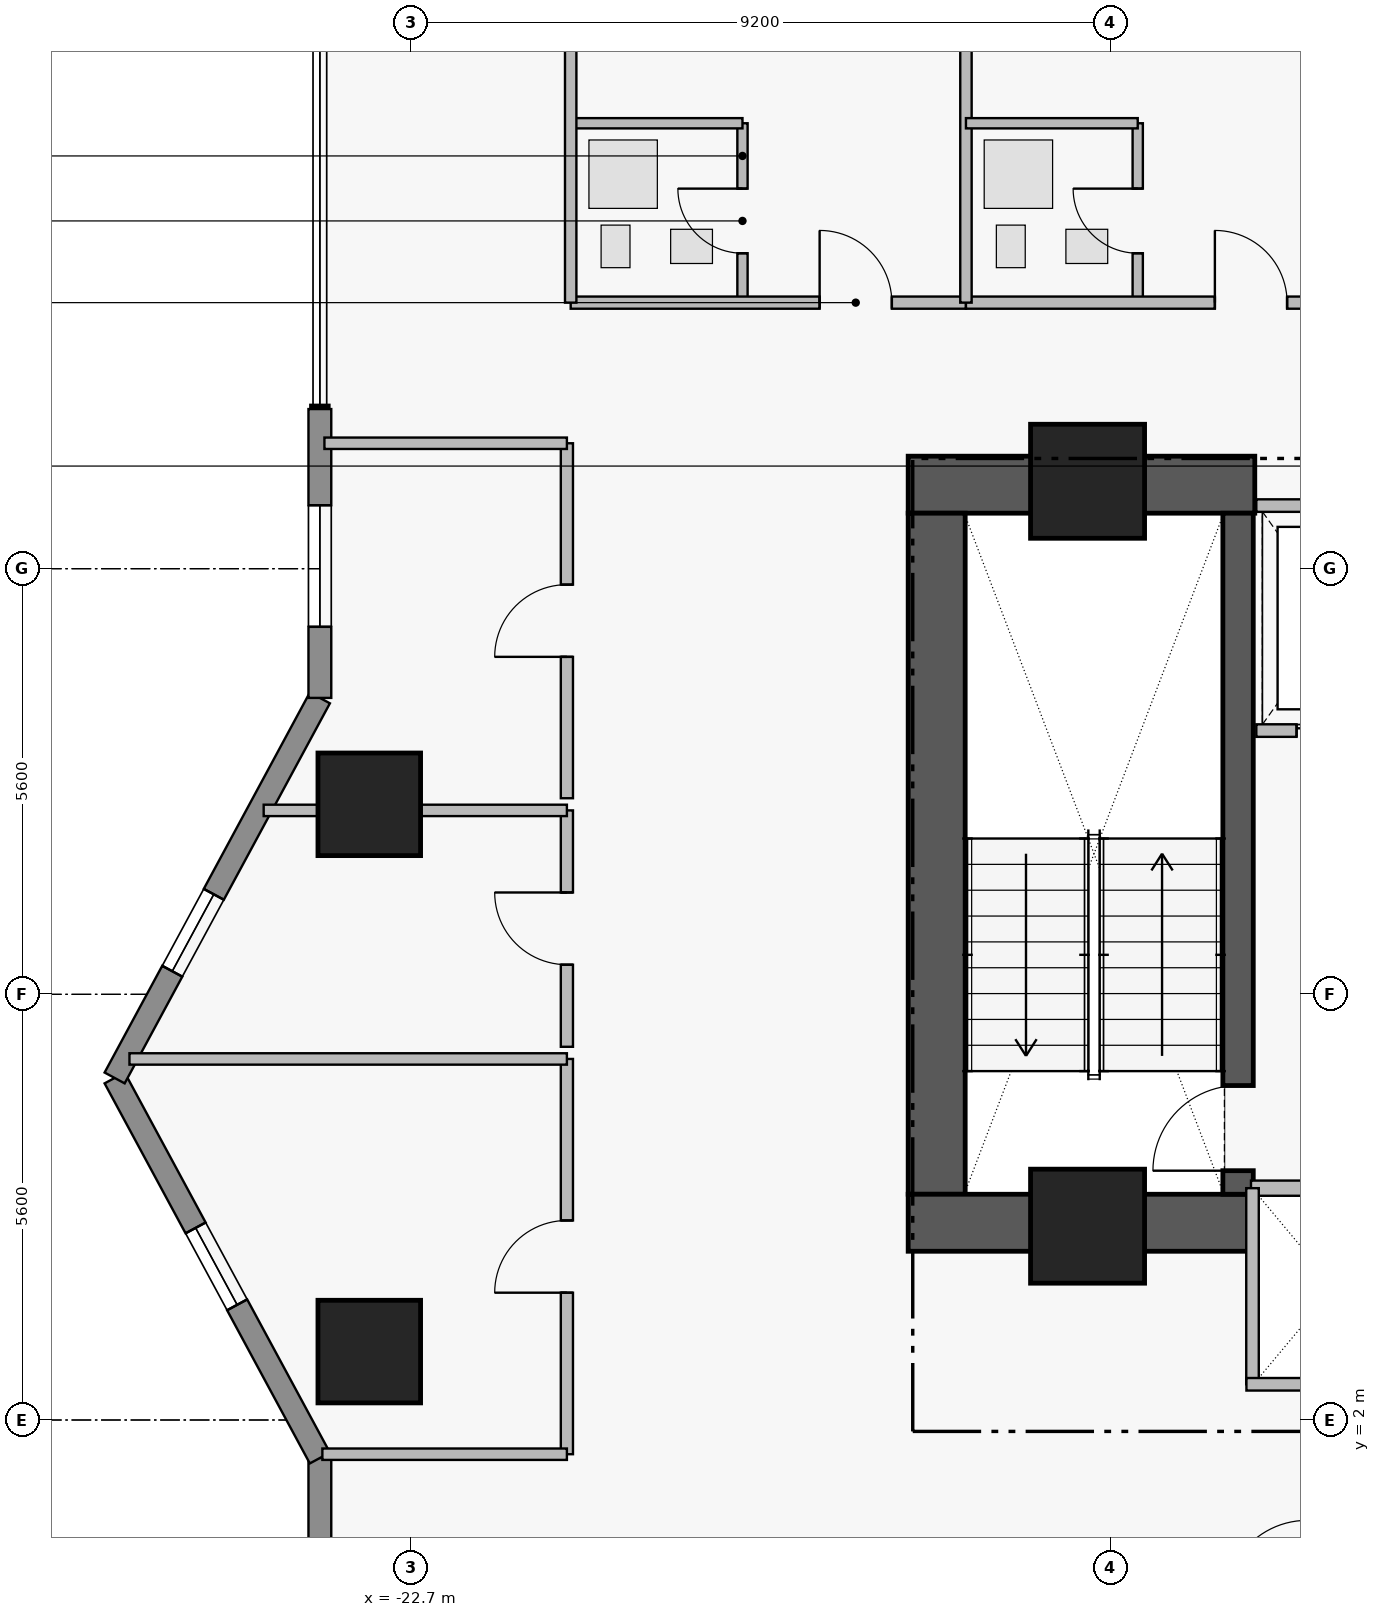
"""IFC4 building model, lengths in metres.
Left out: names, types, materials, properties, quantities, classifications, styles, units other than length and angle.
Written with IfcOpenShell. Run it as: python <this file> out.ifc"""

import sys

from ifc_helpers import new_model, si_unit, direction, frame, frame_2d, origin, origin_2d, place, context, subcontext, project, spatial, rectangle, extrude, element, fill, save


model = new_model("IFC4")
c1 = context("Model", 3, precision=1e-05, world=origin(), true_north=direction((0.0, 1.0)))
c2 = subcontext(c1, "Body", "Model", "MODEL_VIEW")
j1 = project(units=[si_unit("LENGTHUNIT", "METRE"), si_unit("PLANEANGLEUNIT", "RADIAN")], contexts=[c1])
p1 = place(None, origin())
s1 = spatial("IfcSite", under=j1, at=p1, CompositionType="ELEMENT")
p2 = place(p1, origin())
s2 = spatial("IfcBuilding", under=s1, at=p2, CompositionType="ELEMENT")
p3 = place(p2, frame((0.0, 0.0, 106.6)))
s3 = spatial("IfcBuildingStorey", under=s2, at=p3, CompositionType="ELEMENT", Elevation=106.6)
p4 = place(p3, frame((-16.16, 14.305, 0.0), z_axis=(0.0, 0.0, 1.0), x_axis=(1.0, 0.0, 0.0)))
e1 = element("IfcWall", 1, at=p4, inside=s3, PredefinedType="SHEAR", context=c2, shape_type="SweptSolid", body=[
    extrude(rectangle(XDim=4.56, YDim=0.75, at=frame_2d((2.28, 0.0))), origin(), (0.0, 0.0, 1.0), 3.46),
])
p5 = place(p3, frame((-15.785, 4.97, 0.0), z_axis=(0.0, 0.0, 1.0), x_axis=(0.0, 1.0, 0.0)))
e2 = element("IfcWall", 2, at=p5, inside=s3, PredefinedType="SHEAR", context=c2, shape_type="SweptSolid", body=[
    extrude(rectangle(XDim=8.96, YDim=0.75, at=frame_2d((4.48, 0.0))), origin(), (0.0, 0.0, 1.0), 3.46),
])
p6 = place(p3, frame((-16.16, 4.595, 0.0), z_axis=(0.0, 0.0, 1.0), x_axis=(1.0, 0.0, 0.0)))
e3 = element("IfcWall", 3, at=p6, inside=s3, PredefinedType="SHEAR", context=c2, shape_type="SweptSolid", body=[
    extrude(rectangle(XDim=4.56, YDim=0.75, at=frame_2d((2.28, 0.0))), origin(), (0.0, 0.0, 1.0), 3.46),
])
p7 = place(p3, frame((-11.82, 4.97, 0.0), z_axis=(0.0, 0.0, 1.0), x_axis=(0.0, 1.0, 0.0)))
e4 = element("IfcWall", 4, at=p7, inside=s3, PredefinedType="SHEAR", context=c2, shape_type="SweptSolid", body=[
    extrude(rectangle(XDim=8.96, YDim=0.4, at=frame_2d((4.48, 0.0))), origin(), (0.0, 0.0, 1.0), 3.46),
])
p8 = place(p7, frame((0.31, 0.0, 0.0)))
e5 = element("IfcOpeningElement", 5, at=p8, cuts=e4, PredefinedType="OPENING", context=c2, shape_type="SweptSolid", body=[
    extrude(rectangle(XDim=1.12, YDim=2.22, at=frame_2d((0.56, 1.11))), frame((0.0, 0.21, 0.0), z_axis=(0.0, -1.0, 0.0), x_axis=(1.0, 0.0, 0.0)), (0.0, 0.0, 1.0), 0.42),
])
for number, where, z_axis, x_axis in (
    (6, (-13.8, 14.35, 0.0), (0.0, 0.0, 1.0), (1.0, 0.0, 0.0)),
    (7, (-13.8, 4.55, 0.0), (0.0, 0.0, 1.0), (1.0, 0.0, 0.0)),
):
    element("IfcColumn", number, at=place(p3, frame(where, z_axis=z_axis, x_axis=x_axis)), inside=s3, PredefinedType="COLUMN", context=c2, shape_type="SweptSolid", body=[
        extrude(rectangle(XDim=1.5, YDim=1.5, at=origin_2d()), origin(), (0.0, 0.0, 1.0), 3.65),
    ])
for number, where, z_axis, x_axis in (
    (8, (-23.25, 2.9, 0.0), (0.0, 0.0, 1.0), (1.0, 0.0, 0.0)),
    (9, (-23.25, 10.1, 0.0), (0.0, 0.0, 1.0), (1.0, 0.0, 0.0)),
):
    element("IfcColumn", number, at=place(p3, frame(where, z_axis=z_axis, x_axis=x_axis)), inside=s3, PredefinedType="COLUMN", context=c2, shape_type="SweptSolid", body=[
        extrude(rectangle(XDim=1.35, YDim=1.35, at=origin_2d()), origin(), (0.0, 0.0, 1.0), 3.65),
    ])
p9 = place(p3, frame((-23.9, 0.35, 0.0), z_axis=(0.0, 0.0, 1.0), x_axis=(0.0, 1.0, 0.0)))
e10 = element("IfcWall", 10, at=p9, inside=s3, PredefinedType="STANDARD", context=c2, shape_type="SweptSolid", body=[
    extrude(rectangle(XDim=1.15, YDim=0.3, at=frame_2d((0.575, 0.0))), origin(), (0.0, 0.0, 1.0), 3.43),
])
p10 = place(p3, frame((-23.9, 1.5, 0.0), z_axis=(0.0, 0.0, 1.0), x_axis=(-0.475175525499, 0.879891027325, 0.0)))
e11 = element("IfcWall", 11, at=p10, inside=s3, PredefinedType="STANDARD", context=c2, shape_type="SweptSolid", body=[
    extrude(rectangle(XDim=5.683, YDim=0.3, at=frame_2d((2.841, 0.0))), origin(), (0.0, 0.0, 1.0), 3.43),
])
p11 = place(p10, frame((2.29, 0.0, 1.25)))
e12 = element("IfcOpeningElement", 12, at=p11, cuts=e11, PredefinedType="OPENING", context=c2, shape_type="SweptSolid", body=[
    extrude(rectangle(XDim=1.15, YDim=1.55, at=frame_2d((0.575, 0.775))), frame((0.0, 0.16, 0.0), z_axis=(0.0, -1.0, 0.0), x_axis=(1.0, 0.0, 0.0)), (0.0, 0.0, 1.0), 0.32),
])
p12 = place(p3, frame((-26.6, 6.5, 0.0), z_axis=(0.0, 0.0, 1.0), x_axis=(0.475175525499, 0.879891027325, 0.0)))
e13 = element("IfcWall", 13, at=p12, inside=s3, PredefinedType="STANDARD", context=c2, shape_type="SweptSolid", body=[
    extrude(rectangle(XDim=5.683, YDim=0.3, at=frame_2d((2.841, 0.0))), origin(), (0.0, 0.0, 1.0), 3.43),
])
p13 = place(p12, frame((1.596, 0.0, 1.25)))
e14 = element("IfcOpeningElement", 14, at=p13, cuts=e13, PredefinedType="OPENING", context=c2, shape_type="SweptSolid", body=[
    extrude(rectangle(XDim=1.15, YDim=1.55, at=frame_2d((0.575, 0.775))), frame((0.0, 0.16, 0.0), z_axis=(0.0, -1.0, 0.0), x_axis=(1.0, 0.0, 0.0)), (0.0, 0.0, 1.0), 0.32),
])
p14 = place(p3, frame((-23.9, 11.5, 0.0), z_axis=(0.0, 0.0, 1.0), x_axis=(0.0, 1.0, 0.0)))
e15 = element("IfcWall", 15, at=p14, inside=s3, PredefinedType="STANDARD", context=c2, shape_type="SweptSolid", body=[
    extrude(rectangle(XDim=3.8, YDim=0.3, at=frame_2d((1.9, 0.0))), origin(), (0.0, 0.0, 1.0), 3.43),
])
p15 = place(p14, frame((0.935, 0.0, 0.85)))
e16 = element("IfcOpeningElement", 16, at=p15, cuts=e15, PredefinedType="OPENING", context=c2, shape_type="SweptSolid", body=[
    extrude(rectangle(XDim=1.6, YDim=1.8, at=frame_2d((0.8, 0.9))), frame((0.0, 0.16, 0.0), z_axis=(0.0, -1.0, 0.0), x_axis=(1.0, 0.0, 0.0)), (0.0, 0.0, 1.0), 0.32),
])
p16 = place(p3, frame((-11.58, 11.07, 0.0), z_axis=(0.0, 0.0, 1.0), x_axis=(1.0, 0.0, 0.0)))
e17 = element("IfcWall", 17, at=p16, inside=s3, PredefinedType="PARTITIONING", context=c2, shape_type="SweptSolid", body=[
    extrude(rectangle(XDim=2.16, YDim=0.165, at=frame_2d((1.08, 0.0))), origin(), (0.0, 0.0, 1.0), 3.43),
])
p17 = place(p16, frame((0.53, 0.0, 0.0)))
e18 = element("IfcOpeningElement", 18, at=p17, cuts=e17, PredefinedType="OPENING", context=c2, shape_type="SweptSolid", body=[
    extrude(rectangle(XDim=1.15, YDim=2.25, at=frame_2d((0.575, 1.125))), frame((0.0, 0.093, 0.0), z_axis=(0.0, -1.0, 0.0), x_axis=(1.0, 0.0, 0.0)), (0.0, 0.0, 1.0), 0.185),
])
p18 = place(p3, frame((-18.34, 16.7, 0.0), z_axis=(0.0, 0.0, 1.0), x_axis=(0.0, 1.0, 0.0)))
e19 = element("IfcWall", 19, at=p18, inside=s3, PredefinedType="PLUMBINGWALL", context=c2, shape_type="SweptSolid", body=[
    extrude(rectangle(XDim=2.36, YDim=0.135, at=frame_2d((1.18, 0.0))), origin(), (0.0, 0.0, 1.0), 3.43),
])
p19 = place(p18, frame((0.65, 0.0, 0.0)))
e20 = element("IfcOpeningElement", 20, at=p19, cuts=e19, PredefinedType="OPENING", context=c2, shape_type="SweptSolid", body=[
    extrude(rectangle(XDim=0.85, YDim=2.1, at=frame_2d((0.425, 1.05))), frame((0.0, 0.077, 0.0), z_axis=(0.0, -1.0, 0.0), x_axis=(1.0, 0.0, 0.0)), (0.0, 0.0, 1.0), 0.155),
])
p20 = place(p3, frame((-20.6, 16.7, 0.0), z_axis=(0.0, 0.0, 1.0), x_axis=(1.0, 0.0, 0.0)))
e21 = element("IfcWall", 21, at=p20, inside=s3, PredefinedType="PARTITIONING", context=c2, shape_type="SweptSolid", body=[
    extrude(rectangle(XDim=5.2, YDim=0.16, at=frame_2d((2.6, 0.0))), origin(), (0.0, 0.0, 1.0), 3.43),
])
p21 = place(p20, frame((3.275, 0.0, 0.0)))
e22 = element("IfcOpeningElement", 22, at=p21, cuts=e21, PredefinedType="OPENING", context=c2, shape_type="SweptSolid", body=[
    extrude(rectangle(XDim=0.95, YDim=2.15, at=frame_2d((0.475, 1.075))), frame((0.0, 0.09, 0.0), z_axis=(0.0, -1.0, 0.0), x_axis=(1.0, 0.0, 0.0)), (0.0, 0.0, 1.0), 0.18),
])
p22 = place(p3, frame((-13.14, 16.7, 0.0), z_axis=(0.0, 0.0, 1.0), x_axis=(0.0, 1.0, 0.0)))
e23 = element("IfcWall", 23, at=p22, inside=s3, PredefinedType="PLUMBINGWALL", context=c2, shape_type="SweptSolid", body=[
    extrude(rectangle(XDim=2.36, YDim=0.135, at=frame_2d((1.18, 0.0))), origin(), (0.0, 0.0, 1.0), 3.43),
])
p23 = place(p22, frame((0.65, 0.0, 0.0)))
e24 = element("IfcOpeningElement", 24, at=p23, cuts=e23, PredefinedType="OPENING", context=c2, shape_type="SweptSolid", body=[
    extrude(rectangle(XDim=0.85, YDim=2.1, at=frame_2d((0.425, 1.05))), frame((0.0, 0.077, 0.0), z_axis=(0.0, -1.0, 0.0), x_axis=(1.0, 0.0, 0.0)), (0.0, 0.0, 1.0), 0.155),
])
p24 = place(p3, frame((-15.4, 16.7, 0.0), z_axis=(0.0, 0.0, 1.0), x_axis=(1.0, 0.0, 0.0)))
e25 = element("IfcWall", 25, at=p24, inside=s3, PredefinedType="PARTITIONING", context=c2, shape_type="SweptSolid", body=[
    extrude(rectangle(XDim=5.2, YDim=0.16, at=frame_2d((2.6, 0.0))), origin(), (0.0, 0.0, 1.0), 2.973),
])
p25 = place(p24, frame((3.275, 0.0, 0.0)))
e26 = element("IfcOpeningElement", 26, at=p25, cuts=e25, PredefinedType="OPENING", context=c2, shape_type="SweptSolid", body=[
    extrude(rectangle(XDim=0.95, YDim=2.15, at=frame_2d((0.475, 1.075))), frame((0.0, 0.09, 0.0), z_axis=(0.0, -1.0, 0.0), x_axis=(1.0, 0.0, 0.0)), (0.0, 0.0, 1.0), 0.18),
])
p26 = place(p3, frame((-20.65, 1.55, 0.0), z_axis=(0.0, 0.0, 1.0), x_axis=(0.0, 1.0, 0.0)))
e27 = element("IfcWall", 27, at=p26, inside=s3, PredefinedType="PARTITIONING", context=c2, shape_type="SweptSolid", body=[
    extrude(rectangle(XDim=5.2, YDim=0.16, at=frame_2d((2.6, 0.0))), origin(), (0.0, 0.0, 1.0), 3.43),
])
p27 = place(p26, frame((2.125, 0.0, 0.0)))
e28 = element("IfcOpeningElement", 28, at=p27, cuts=e27, PredefinedType="OPENING", context=c2, shape_type="SweptSolid", body=[
    extrude(rectangle(XDim=0.95, YDim=2.15, at=frame_2d((0.475, 1.075))), frame((0.0, 0.09, 0.0), z_axis=(0.0, -1.0, 0.0), x_axis=(1.0, 0.0, 0.0)), (0.0, 0.0, 1.0), 0.18),
])
p28 = place(p3, frame((-20.65, 6.91, 0.0), z_axis=(0.0, 0.0, 1.0), x_axis=(0.0, 1.0, 0.0)))
e29 = element("IfcWall", 29, at=p28, inside=s3, PredefinedType="PARTITIONING", context=c2, shape_type="SweptSolid", body=[
    extrude(rectangle(XDim=3.11, YDim=0.16, at=frame_2d((1.555, 0.0))), origin(), (0.0, 0.0, 1.0), 3.43),
])
p29 = place(p28, frame((1.08, 0.0, 0.0)))
e30 = element("IfcOpeningElement", 30, at=p29, cuts=e29, PredefinedType="OPENING", context=c2, shape_type="SweptSolid", body=[
    extrude(rectangle(XDim=0.95, YDim=2.15, at=frame_2d((0.475, 1.075))), frame((0.0, 0.09, 0.0), z_axis=(0.0, -1.0, 0.0), x_axis=(1.0, 0.0, 0.0)), (0.0, 0.0, 1.0), 0.18),
])
p30 = place(p3, frame((-20.65, 10.18, 0.0), z_axis=(0.0, 0.0, 1.0), x_axis=(0.0, 1.0, 0.0)))
e31 = element("IfcWall", 31, at=p30, inside=s3, PredefinedType="PARTITIONING", context=c2, shape_type="SweptSolid", body=[
    extrude(rectangle(XDim=4.67, YDim=0.16, at=frame_2d((2.335, 0.0))), origin(), (0.0, 0.0, 1.0), 3.43),
])
p31 = place(p30, frame((1.86, 0.0, 0.0)))
e32 = element("IfcOpeningElement", 32, at=p31, cuts=e31, PredefinedType="OPENING", context=c2, shape_type="SweptSolid", body=[
    extrude(rectangle(XDim=0.95, YDim=2.15, at=frame_2d((0.475, 1.075))), frame((0.0, 0.09, 0.0), z_axis=(0.0, -1.0, 0.0), x_axis=(1.0, 0.0, 0.0)), (0.0, 0.0, 1.0), 0.18),
])
p32 = place(p3, frame((-11.65, 5.05, 0.0), z_axis=(0.0, 0.0, 1.0), x_axis=(1.0, 0.0, 0.0)))
e33 = element("IfcWall", 33, at=p32, inside=s3, PredefinedType="PARTITIONING", context=c2, shape_type="SweptSolid", body=[
    extrude(rectangle(XDim=2.85, YDim=0.2, at=frame_2d((1.425, 0.0))), origin(), (0.0, 0.0, 1.0), 3.43),
])
p33 = place(p3, frame((-11.58, 14.03, 0.0), z_axis=(0.0, 0.0, 1.0), x_axis=(1.0, 0.0, 0.0)))
e34 = element("IfcWall", 34, at=p33, inside=s3, PredefinedType="PARTITIONING", context=c2, shape_type="SweptSolid", body=[
    extrude(rectangle(XDim=2.16, YDim=0.165, at=frame_2d((1.08, 0.0))), origin(), (0.0, 0.0, 1.0), 3.43),
])
p34 = place(p3, frame((-11.63, 2.47, 0.0), z_axis=(0.0, 0.0, 1.0), x_axis=(0.0, 1.0, 0.0)))
e35 = element("IfcWall", 35, at=p34, inside=s3, PredefinedType="PARTITIONING", context=c2, shape_type="SweptSolid", body=[
    extrude(rectangle(XDim=2.58, YDim=0.165, at=frame_2d((1.29, 0.0))), origin(), (0.0, 0.0, 1.0), 3.43),
])
p35 = place(p3, frame((-11.71, 2.47, 0.0), z_axis=(0.0, 0.0, 1.0), x_axis=(1.0, 0.0, 0.0)))
e36 = element("IfcWall", 36, at=p35, inside=s3, PredefinedType="PARTITIONING", context=c2, shape_type="SweptSolid", body=[
    extrude(rectangle(XDim=2.31, YDim=0.165, at=frame_2d((1.155, 0.0))), origin(), (0.0, 0.0, 1.0), 2.03),
])
p36 = place(p3, frame((-20.6, 19.06, 0.0), z_axis=(0.0, 0.0, 1.0), x_axis=(1.0, 0.0, 0.0)))
e37 = element("IfcWall", 37, at=p36, inside=s3, PredefinedType="PLUMBINGWALL", context=c2, shape_type="SweptSolid", body=[
    extrude(rectangle(XDim=2.26, YDim=0.135, at=frame_2d((1.13, 0.0))), origin(), (0.0, 0.0, 1.0), 3.43),
])
p37 = place(p3, frame((-20.6, 16.7, 0.0), z_axis=(0.0, 0.0, 1.0), x_axis=(0.0, 1.0, 0.0)))
e38 = element("IfcWall", 38, at=p37, inside=s3, PredefinedType="PARTITIONING", context=c2, shape_type="SweptSolid", body=[
    extrude(rectangle(XDim=8.2, YDim=0.15, at=frame_2d((4.1, 0.0))), origin(), (0.0, 0.0, 1.0), 3.43),
])
p38 = place(p3, frame((-15.4, 16.7, 0.0), z_axis=(0.0, 0.0, 1.0), x_axis=(0.0, 1.0, 0.0)))
e39 = element("IfcWall", 39, at=p38, inside=s3, PredefinedType="PARTITIONING", context=c2, shape_type="SweptSolid", body=[
    extrude(rectangle(XDim=11.62, YDim=0.15, at=frame_2d((5.81, 0.0))), origin(), (0.0, 0.0, 1.0), 3.43),
])
p39 = place(p3, frame((-15.4, 19.06, 0.0), z_axis=(0.0, 0.0, 1.0), x_axis=(1.0, 0.0, 0.0)))
e40 = element("IfcWall", 40, at=p39, inside=s3, PredefinedType="PLUMBINGWALL", context=c2, shape_type="SweptSolid", body=[
    extrude(rectangle(XDim=2.26, YDim=0.135, at=frame_2d((1.13, 0.0))), origin(), (0.0, 0.0, 1.0), 2.973),
])
p40 = place(p3, frame((-23.867, 1.55, 0.0), z_axis=(0.0, 0.0, 1.0), x_axis=(1.0, 0.0, 0.0)))
e41 = element("IfcWall", 41, at=p40, inside=s3, PredefinedType="PARTITIONING", context=c2, shape_type="SweptSolid", body=[
    extrude(rectangle(XDim=3.217, YDim=0.15, at=frame_2d((1.608, 0.0))), origin(), (0.0, 0.0, 1.0), 3.43),
])
p41 = place(p3, frame((-26.405, 6.75, 0.0), z_axis=(0.0, 0.0, 1.0), x_axis=(1.0, 0.0, 0.0)))
e42 = element("IfcWall", 42, at=p41, inside=s3, PredefinedType="PARTITIONING", context=c2, shape_type="SweptSolid", body=[
    extrude(rectangle(XDim=5.755, YDim=0.15, at=frame_2d((2.877, 0.0))), origin(), (0.0, 0.0, 1.0), 3.43),
])
p42 = place(p3, frame((-24.639, 10.02, 0.0), z_axis=(0.0, 0.0, 1.0), x_axis=(1.0, 0.0, 0.0)))
e43 = element("IfcWall", 43, at=p42, inside=s3, PredefinedType="PARTITIONING", context=c2, shape_type="SweptSolid", body=[
    extrude(rectangle(XDim=3.989, YDim=0.15, at=frame_2d((1.995, 0.0))), origin(), (0.0, 0.0, 1.0), 3.43),
])
p43 = place(p3, frame((-23.84, 14.85, 0.0), z_axis=(0.0, 0.0, 1.0), x_axis=(1.0, 0.0, 0.0)))
e44 = element("IfcWall", 44, at=p43, inside=s3, PredefinedType="PARTITIONING", context=c2, shape_type="SweptSolid", body=[
    extrude(rectangle(XDim=3.19, YDim=0.15, at=frame_2d((1.595, 0.0))), origin(), (0.0, 0.0, 1.0), 3.43),
])
p44 = place(p11, origin())
e45 = element("IfcWindow", 45, at=p44, inside=s3, PartitioningType="SINGLE_PANEL", PredefinedType="WINDOW", context=c2, shape_type="SweptSolid", body=[
    extrude(rectangle(XDim=1.15, YDim=1.55, at=frame_2d((0.575, 0.775))), frame((0.0, 0.03, 0.0), z_axis=(0.0, -1.0, 0.0), x_axis=(1.0, 0.0, 0.0)), (0.0, 0.0, 1.0), 0.06),
])
fill(e12, e45)
p45 = place(p13, origin())
e46 = element("IfcWindow", 46, at=p45, inside=s3, PartitioningType="SINGLE_PANEL", PredefinedType="WINDOW", context=c2, shape_type="SweptSolid", body=[
    extrude(rectangle(XDim=1.15, YDim=1.55, at=frame_2d((0.575, 0.775))), frame((0.0, 0.03, 0.0), z_axis=(0.0, -1.0, 0.0), x_axis=(1.0, 0.0, 0.0)), (0.0, 0.0, 1.0), 0.06),
])
fill(e14, e46)
p46 = place(p15, origin())
e47 = element("IfcWindow", 47, at=p46, inside=s3, PartitioningType="SINGLE_PANEL", PredefinedType="WINDOW", context=c2, shape_type="SweptSolid", body=[
    extrude(rectangle(XDim=1.6, YDim=1.8, at=frame_2d((0.8, 0.9))), frame((0.0, 0.03, 0.0), z_axis=(0.0, -1.0, 0.0), x_axis=(1.0, 0.0, 0.0)), (0.0, 0.0, 1.0), 0.06),
])
fill(e16, e47)
p47 = place(p8, origin())
e48 = element("IfcDoor", 48, at=p47, inside=s3, OperationType="SINGLE_SWING_LEFT", PredefinedType="DOOR", context=c2, shape_type="SweptSolid", body=[
    extrude(rectangle(XDim=1.12, YDim=2.22, at=frame_2d((0.56, 1.11))), frame((0.0, 0.025, 0.0), z_axis=(0.0, -1.0, 0.0), x_axis=(1.0, 0.0, 0.0)), (0.0, 0.0, 1.0), 0.05),
])
fill(e5, e48)
p48 = place(p17, origin())
e49 = element("IfcDoor", 49, at=p48, inside=s3, OperationType="SLIDING_TO_LEFT", PredefinedType="DOOR", context=c2, shape_type="SweptSolid", body=[
    extrude(rectangle(XDim=1.15, YDim=2.25, at=frame_2d((0.575, 1.125))), frame((0.0, 0.025, 0.0), z_axis=(0.0, -1.0, 0.0), x_axis=(1.0, 0.0, 0.0)), (0.0, 0.0, 1.0), 0.05),
])
fill(e18, e49)
p49 = place(p19, origin())
e50 = element("IfcDoor", 50, at=p49, inside=s3, OperationType="SINGLE_SWING_RIGHT", PredefinedType="DOOR", context=c2, shape_type="SweptSolid", body=[
    extrude(rectangle(XDim=0.85, YDim=2.1, at=frame_2d((0.425, 1.05))), frame((0.0, 0.025, 0.0), z_axis=(0.0, -1.0, 0.0), x_axis=(1.0, 0.0, 0.0)), (0.0, 0.0, 1.0), 0.05),
])
fill(e20, e50)
p50 = place(p21, origin())
e51 = element("IfcDoor", 51, at=p50, inside=s3, OperationType="SINGLE_SWING_LEFT", PredefinedType="DOOR", context=c2, shape_type="SweptSolid", body=[
    extrude(rectangle(XDim=0.95, YDim=2.15, at=frame_2d((0.475, 1.075))), frame((0.0, 0.025, 0.0), z_axis=(0.0, -1.0, 0.0), x_axis=(1.0, 0.0, 0.0)), (0.0, 0.0, 1.0), 0.05),
])
fill(e22, e51)
p51 = place(p23, origin())
e52 = element("IfcDoor", 52, at=p51, inside=s3, OperationType="SINGLE_SWING_RIGHT", PredefinedType="DOOR", context=c2, shape_type="SweptSolid", body=[
    extrude(rectangle(XDim=0.85, YDim=2.1, at=frame_2d((0.425, 1.05))), frame((0.0, 0.025, 0.0), z_axis=(0.0, -1.0, 0.0), x_axis=(1.0, 0.0, 0.0)), (0.0, 0.0, 1.0), 0.05),
])
fill(e24, e52)
p52 = place(p25, origin())
e53 = element("IfcDoor", 53, at=p52, inside=s3, OperationType="SINGLE_SWING_LEFT", PredefinedType="DOOR", context=c2, shape_type="SweptSolid", body=[
    extrude(rectangle(XDim=0.95, YDim=2.15, at=frame_2d((0.475, 1.075))), frame((0.0, 0.025, 0.0), z_axis=(0.0, -1.0, 0.0), x_axis=(1.0, 0.0, 0.0)), (0.0, 0.0, 1.0), 0.05),
])
fill(e26, e53)
p53 = place(p27, origin())
e54 = element("IfcDoor", 54, at=p53, inside=s3, OperationType="SINGLE_SWING_LEFT", PredefinedType="DOOR", context=c2, shape_type="SweptSolid", body=[
    extrude(rectangle(XDim=0.95, YDim=2.15, at=frame_2d((0.475, 1.075))), frame((0.0, 0.025, 0.0), z_axis=(0.0, -1.0, 0.0), x_axis=(1.0, 0.0, 0.0)), (0.0, 0.0, 1.0), 0.05),
])
fill(e28, e54)
p54 = place(p29, origin())
e55 = element("IfcDoor", 55, at=p54, inside=s3, OperationType="SINGLE_SWING_RIGHT", PredefinedType="DOOR", context=c2, shape_type="SweptSolid", body=[
    extrude(rectangle(XDim=0.95, YDim=2.15, at=frame_2d((0.475, 1.075))), frame((0.0, 0.025, 0.0), z_axis=(0.0, -1.0, 0.0), x_axis=(1.0, 0.0, 0.0)), (0.0, 0.0, 1.0), 0.05),
])
fill(e30, e55)
p55 = place(p31, origin())
e56 = element("IfcDoor", 56, at=p55, inside=s3, OperationType="SINGLE_SWING_LEFT", PredefinedType="DOOR", context=c2, shape_type="SweptSolid", body=[
    extrude(rectangle(XDim=0.95, YDim=2.15, at=frame_2d((0.475, 1.075))), frame((0.0, 0.025, 0.0), z_axis=(0.0, -1.0, 0.0), x_axis=(1.0, 0.0, 0.0)), (0.0, 0.0, 1.0), 0.05),
])
fill(e32, e56)
save(model, sys.argv[1])
